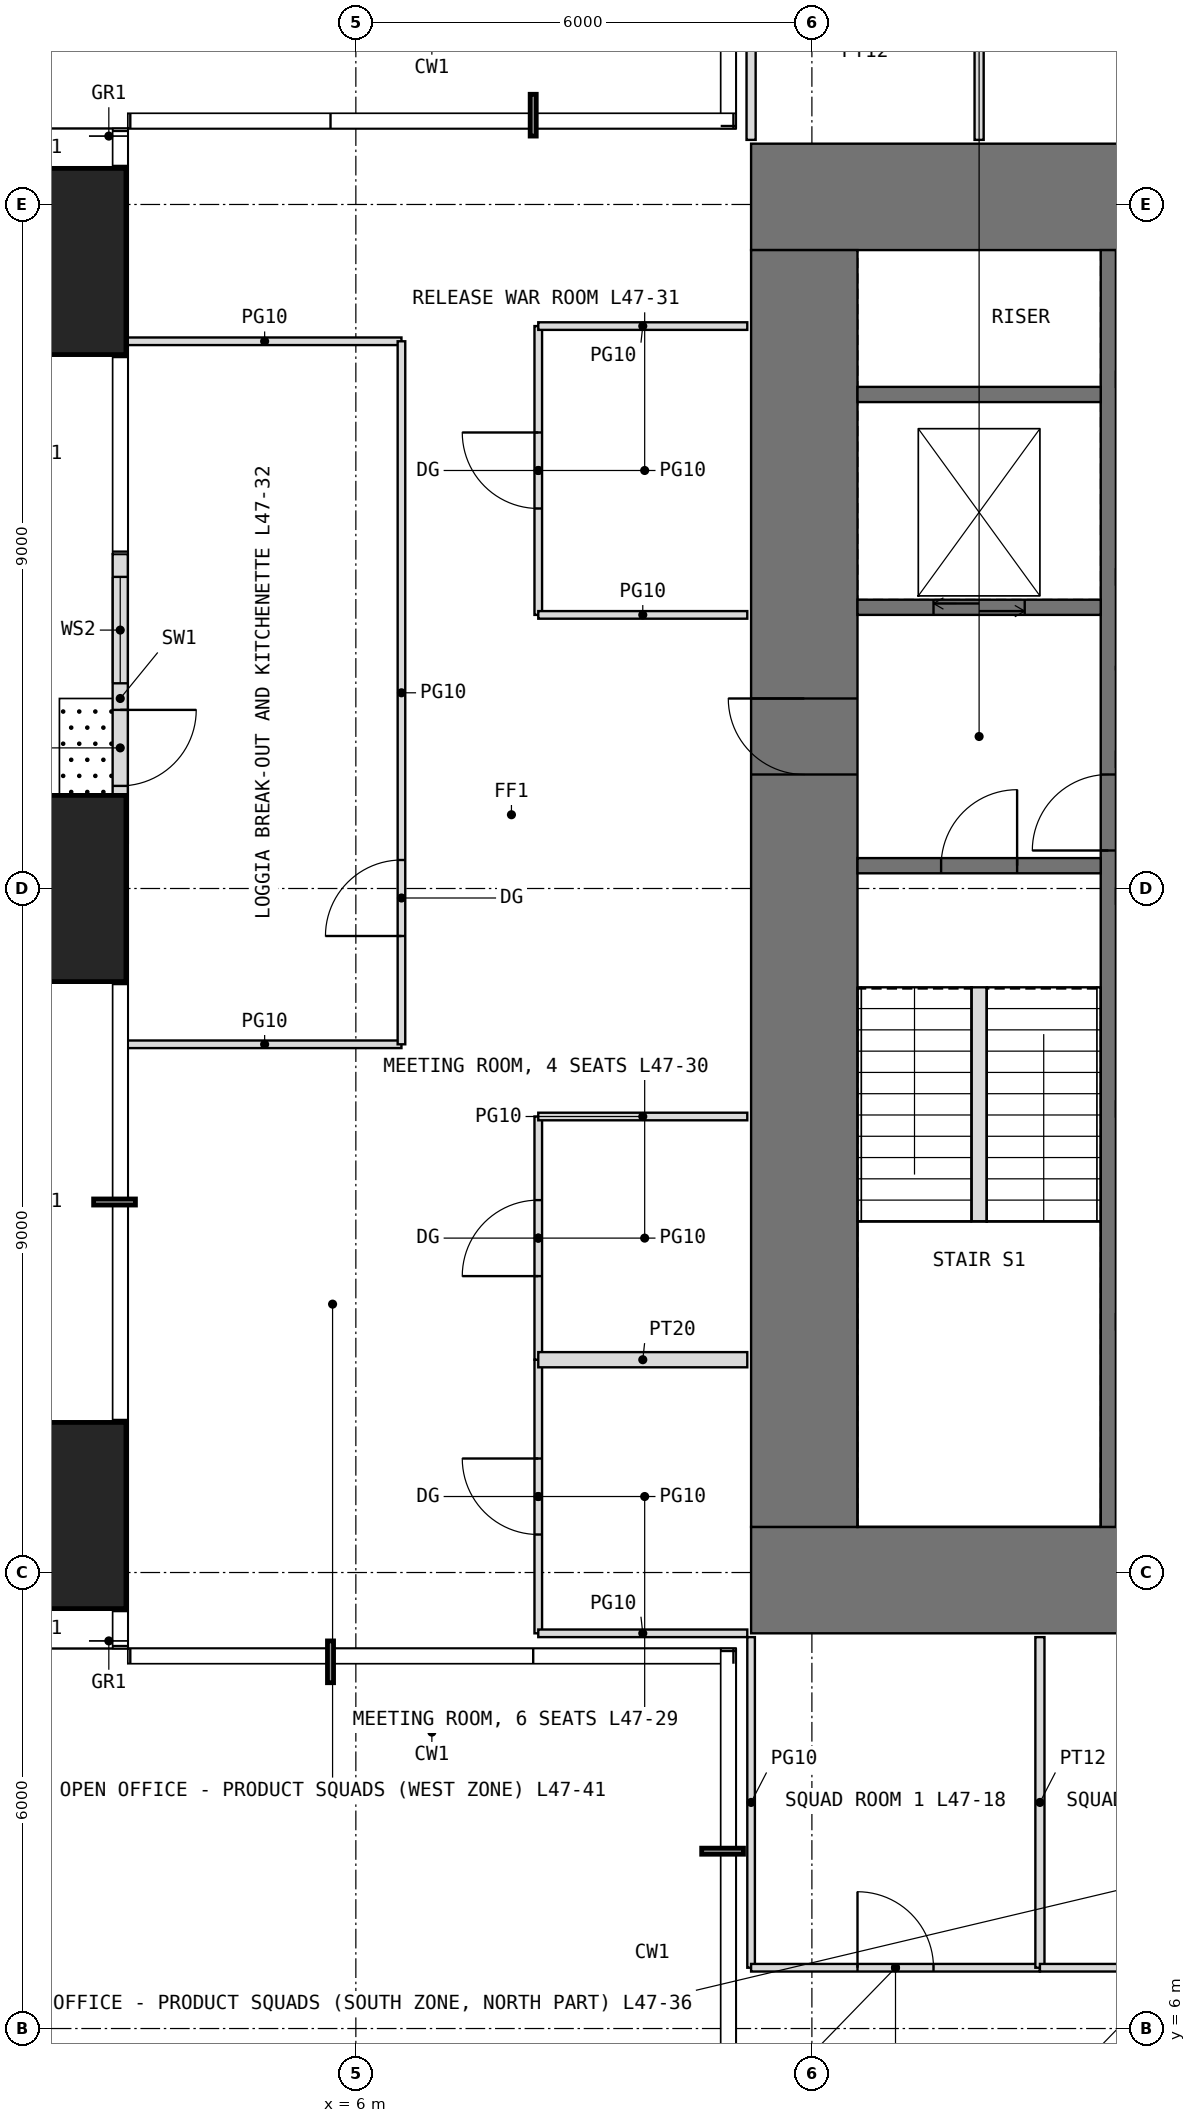
"""IFC4 building model, lengths in metres.
Left out: names, types, materials, properties, quantities, classifications, styles, units other than length and angle.
Written with IfcOpenShell. Run it as: python <this file> out.ifc"""

import sys

from ifc_helpers import new_model, si_unit, direction, frame, frame_2d, origin, origin_2d, place, context, subcontext, project, spatial, rectangle, extrude, element, fill, save


model = new_model("IFC4")
c1 = context("Model", 3, precision=1e-05, world=origin(), true_north=direction((0.0, 1.0)))
c2 = subcontext(c1, "Body", "Model", "MODEL_VIEW")
j1 = project(units=[si_unit("LENGTHUNIT", "METRE"), si_unit("PLANEANGLEUNIT", "RADIAN")], contexts=[c1])
p1 = place(None, origin())
s1 = spatial("IfcSite", under=j1, at=p1, CompositionType="ELEMENT")
p2 = place(p1, origin())
s2 = spatial("IfcBuilding", under=s1, at=p2, CompositionType="ELEMENT")
p3 = place(p2, frame((0.0, 0.0, 198.5)))
s3 = spatial("IfcBuildingStorey", under=s2, at=p3, CompositionType="ELEMENT", Elevation=198.5)
for number, where, z_axis, x_axis in (
    (1, (1.75, 12.75, 0.0), (0.0, 0.0, 1.0), (1.0, 0.0, 0.0)),
    (2, (1.75, 21.0, 0.0), (0.0, 0.0, 1.0), (1.0, 0.0, 0.0)),
    (3, (1.75, 29.25, 0.0), (0.0, 0.0, 1.0), (1.0, 0.0, 0.0)),
):
    element("IfcColumn", number, at=place(p3, frame(where, z_axis=z_axis, x_axis=x_axis)), inside=s3, PredefinedType="COLUMN", context=c2, shape_type="SweptSolid", body=[
        extrude(rectangle(XDim=2.45, YDim=2.45, at=origin_2d()), origin(), (0.0, 0.0, 1.0), 4.0),
    ])
p4 = place(p3, frame((2.9, 25.4, 0.0), z_axis=(0.0, 0.0, 1.0), x_axis=(0.0, -1.0, 0.0)))
e4 = element("IfcWall", 4, at=p4, inside=s3, PredefinedType="USERDEFINED", context=c2, shape_type="SweptSolid", body=[
    extrude(rectangle(XDim=3.8, YDim=0.2, at=frame_2d((1.9, 0.0))), origin(), (0.0, 0.0, 1.0), 3.75),
])
p5 = place(p4, frame((2.05, 0.0, 0.0)))
e5 = element("IfcOpeningElement", 5, at=p5, cuts=e4, PredefinedType="OPENING", context=c2, shape_type="SweptSolid", body=[
    extrude(rectangle(XDim=1.0, YDim=2.4, at=frame_2d((0.5, 1.2))), frame((0.0, 0.11, 0.0), z_axis=(0.0, -1.0, 0.0), x_axis=(1.0, 0.0, 0.0)), (0.0, 0.0, 1.0), 0.22),
])
p6 = place(p4, frame((0.3, 0.0, 0.3)))
e6 = element("IfcOpeningElement", 6, at=p6, cuts=e4, PredefinedType="OPENING", context=c2, shape_type="SweptSolid", body=[
    extrude(rectangle(XDim=1.4, YDim=2.7, at=frame_2d((0.7, 1.35))), frame((0.0, 0.11, 0.0), z_axis=(0.0, -1.0, 0.0), x_axis=(1.0, 0.0, 0.0)), (0.0, 0.0, 1.0), 0.22),
])
p7 = place(p3, frame((11.2, 11.9, -0.05), z_axis=(0.0, 0.0, 1.0), x_axis=(1.0, 0.0, 0.0)))
e7 = element("IfcWall", 7, at=p7, inside=s3, PredefinedType="SHEAR", context=c2, shape_type="SweptSolid", body=[
    extrude(rectangle(XDim=19.6, YDim=1.4, at=frame_2d((9.8, 0.0))), origin(), (0.0, 0.0, 1.0), 4.0),
])
p8 = place(p7, frame((8.8, 0.0, 0.05)))
e8 = element("IfcOpeningElement", 8, at=p8, cuts=e7, PredefinedType="OPENING", context=c2, shape_type="SweptSolid", body=[
    extrude(rectangle(XDim=2.0, YDim=2.2, at=frame_2d((1.0, 1.1))), frame((0.0, 0.71, 0.0), z_axis=(0.0, -1.0, 0.0), x_axis=(1.0, 0.0, 0.0)), (0.0, 0.0, 1.0), 1.42),
])
p9 = place(p3, frame((11.2, 30.1, -0.05), z_axis=(0.0, 0.0, 1.0), x_axis=(1.0, 0.0, 0.0)))
e9 = element("IfcWall", 9, at=p9, inside=s3, PredefinedType="SHEAR", context=c2, shape_type="SweptSolid", body=[
    extrude(rectangle(XDim=19.6, YDim=1.4, at=frame_2d((9.8, 0.0))), origin(), (0.0, 0.0, 1.0), 4.0),
])
p10 = place(p9, frame((8.8, 0.0, 0.05)))
e10 = element("IfcOpeningElement", 10, at=p10, cuts=e9, PredefinedType="OPENING", context=c2, shape_type="SweptSolid", body=[
    extrude(rectangle(XDim=2.0, YDim=2.2, at=frame_2d((1.0, 1.1))), frame((0.0, 0.71, 0.0), z_axis=(0.0, -1.0, 0.0), x_axis=(1.0, 0.0, 0.0)), (0.0, 0.0, 1.0), 1.42),
])
p11 = place(p3, frame((11.9, 12.6, -0.05), z_axis=(0.0, 0.0, 1.0), x_axis=(0.0, 1.0, 0.0)))
e11 = element("IfcWall", 11, at=p11, inside=s3, PredefinedType="SHEAR", context=c2, shape_type="SweptSolid", body=[
    extrude(rectangle(XDim=16.8, YDim=1.4, at=frame_2d((8.4, 0.0))), origin(), (0.0, 0.0, 1.0), 4.0),
])
p12 = place(p11, frame((9.9, 0.0, 0.05)))
e12 = element("IfcOpeningElement", 12, at=p12, cuts=e11, PredefinedType="OPENING", context=c2, shape_type="SweptSolid", body=[
    extrude(rectangle(XDim=1.0, YDim=2.2, at=frame_2d((0.5, 1.1))), frame((0.0, 0.71, 0.0), z_axis=(0.0, -1.0, 0.0), x_axis=(1.0, 0.0, 0.0)), (0.0, 0.0, 1.0), 1.42),
])
p13 = place(p3, frame((15.9, 12.6, -0.05), z_axis=(0.0, 0.0, 1.0), x_axis=(0.0, 1.0, 0.0)))
e13 = element("IfcWall", 13, at=p13, inside=s3, PredefinedType="SHEAR", context=c2, shape_type="SweptSolid", body=[
    extrude(rectangle(XDim=16.8, YDim=0.2, at=frame_2d((8.4, 0.0))), origin(), (0.0, 0.0, 1.0), 4.0),
])
p14 = place(p13, frame((8.9, 0.0, 0.05)))
e14 = element("IfcOpeningElement", 14, at=p14, cuts=e13, PredefinedType="OPENING", context=c2, shape_type="SweptSolid", body=[
    extrude(rectangle(XDim=1.0, YDim=2.2, at=frame_2d((0.5, 1.1))), frame((0.0, 0.11, 0.0), z_axis=(0.0, -1.0, 0.0), x_axis=(1.0, 0.0, 0.0)), (0.0, 0.0, 1.0), 0.22),
])
p15 = place(p3, frame((12.6, 21.3, -0.05), z_axis=(0.0, 0.0, 1.0), x_axis=(1.0, 0.0, 0.0)))
e15 = element("IfcWall", 15, at=p15, inside=s3, PredefinedType="SHEAR", context=c2, shape_type="SweptSolid", body=[
    extrude(rectangle(XDim=3.2, YDim=0.2, at=frame_2d((1.6, 0.0))), origin(), (0.0, 0.0, 1.0), 4.0),
])
p16 = place(p15, frame((1.1, 0.0, 0.05)))
e16 = element("IfcOpeningElement", 16, at=p16, cuts=e15, PredefinedType="OPENING", context=c2, shape_type="SweptSolid", body=[
    extrude(rectangle(XDim=1.0, YDim=2.2, at=frame_2d((0.5, 1.1))), frame((0.0, 0.11, 0.0), z_axis=(0.0, -1.0, 0.0), x_axis=(1.0, 0.0, 0.0)), (0.0, 0.0, 1.0), 0.22),
])
p17 = place(p3, frame((12.6, 24.7, -0.05), z_axis=(0.0, 0.0, 1.0), x_axis=(1.0, 0.0, 0.0)))
e17 = element("IfcWall", 17, at=p17, inside=s3, PredefinedType="SHEAR", context=c2, shape_type="SweptSolid", body=[
    extrude(rectangle(XDim=3.2, YDim=0.2, at=frame_2d((1.6, 0.0))), origin(), (0.0, 0.0, 1.0), 4.0),
])
p18 = place(p17, frame((1.0, 0.0, 0.05)))
e18 = element("IfcOpeningElement", 18, at=p18, cuts=e17, PredefinedType="OPENING", context=c2, shape_type="SweptSolid", body=[
    extrude(rectangle(XDim=1.2, YDim=2.2, at=frame_2d((0.6, 1.1))), frame((0.0, 0.11, 0.0), z_axis=(0.0, -1.0, 0.0), x_axis=(1.0, 0.0, 0.0)), (0.0, 0.0, 1.0), 0.22),
])
p19 = place(p3, frame((12.6, 27.5, -0.05), z_axis=(0.0, 0.0, 1.0), x_axis=(1.0, 0.0, 0.0)))
e19 = element("IfcWall", 19, at=p19, inside=s3, PredefinedType="SHEAR", context=c2, shape_type="SweptSolid", body=[
    extrude(rectangle(XDim=3.2, YDim=0.2, at=frame_2d((1.6, 0.0))), origin(), (0.0, 0.0, 1.0), 4.0),
])
for number, where, z_axis, x_axis in (
    (20, (3.0, 18.95, 0.0), (0.0, 0.0, 1.0), (1.0, 0.0, 0.0)),
    (21, (3.0, 28.2, 0.0), (0.0, 0.0, 1.0), (1.0, 0.0, 0.0)),
):
    element("IfcWall", number, at=place(p3, frame(where, z_axis=z_axis, x_axis=x_axis)), inside=s3, PredefinedType="PARTITIONING", context=c2, shape_type="SweptSolid", body=[
        extrude(rectangle(XDim=3.6, YDim=0.1, at=frame_2d((1.8, 0.0))), origin(), (0.0, 0.0, 1.0), 3.75),
    ])
p20 = place(p3, frame((6.6, 18.95, 0.0), z_axis=(0.0, 0.0, 1.0), x_axis=(0.0, 1.0, 0.0)))
e22 = element("IfcWall", 22, at=p20, inside=s3, PredefinedType="PARTITIONING", context=c2, shape_type="SweptSolid", body=[
    extrude(rectangle(XDim=9.25, YDim=0.1, at=frame_2d((4.625, 0.0))), origin(), (0.0, 0.0, 1.0), 3.75),
])
p21 = place(p20, frame((1.425, 0.0, 0.0)))
e23 = element("IfcOpeningElement", 23, at=p21, cuts=e22, PredefinedType="OPENING", context=c2, shape_type="SweptSolid", body=[
    extrude(rectangle(XDim=1.0, YDim=2.4, at=frame_2d((0.5, 1.2))), frame((0.0, 0.06, 0.0), z_axis=(0.0, -1.0, 0.0), x_axis=(1.0, 0.0, 0.0)), (0.0, 0.0, 1.0), 0.12),
])
p22 = place(p3, frame((8.4, 11.2, 0.0), z_axis=(0.0, 0.0, 1.0), x_axis=(0.0, 1.0, 0.0)))
e24 = element("IfcWall", 24, at=p22, inside=s3, PredefinedType="PARTITIONING", context=c2, shape_type="SweptSolid", body=[
    extrude(rectangle(XDim=3.6, YDim=0.1, at=frame_2d((1.8, 0.0))), origin(), (0.0, 0.0, 1.0), 3.75),
])
p23 = place(p22, frame((1.3, 0.0, 0.0)))
e25 = element("IfcOpeningElement", 25, at=p23, cuts=e24, PredefinedType="OPENING", context=c2, shape_type="SweptSolid", body=[
    extrude(rectangle(XDim=1.0, YDim=2.4, at=frame_2d((0.5, 1.2))), frame((0.0, 0.06, 0.0), z_axis=(0.0, -1.0, 0.0), x_axis=(1.0, 0.0, 0.0)), (0.0, 0.0, 1.0), 0.12),
])
p24 = place(p3, frame((8.4, 11.2, 0.0), z_axis=(0.0, 0.0, 1.0), x_axis=(1.0, 0.0, 0.0)))
e26 = element("IfcWall", 26, at=p24, inside=s3, PredefinedType="PARTITIONING", context=c2, shape_type="SweptSolid", body=[
    extrude(rectangle(XDim=2.75, YDim=0.1, at=frame_2d((1.375, 0.0))), origin(), (0.0, 0.0, 1.0), 3.75),
])
p25 = place(p3, frame((8.4, 14.8, 0.0), z_axis=(0.0, 0.0, 1.0), x_axis=(0.0, 1.0, 0.0)))
e27 = element("IfcWall", 27, at=p25, inside=s3, PredefinedType="PARTITIONING", context=c2, shape_type="SweptSolid", body=[
    extrude(rectangle(XDim=3.2, YDim=0.1, at=frame_2d((1.6, 0.0))), origin(), (0.0, 0.0, 1.0), 3.75),
])
p26 = place(p25, frame((1.1, 0.0, 0.0)))
e28 = element("IfcOpeningElement", 28, at=p26, cuts=e27, PredefinedType="OPENING", context=c2, shape_type="SweptSolid", body=[
    extrude(rectangle(XDim=1.0, YDim=2.4, at=frame_2d((0.5, 1.2))), frame((0.0, 0.06, 0.0), z_axis=(0.0, -1.0, 0.0), x_axis=(1.0, 0.0, 0.0)), (0.0, 0.0, 1.0), 0.12),
])
p27 = place(p3, frame((8.4, 14.8, 0.0), z_axis=(0.0, 0.0, 1.0), x_axis=(1.0, 0.0, 0.0)))
e29 = element("IfcWall", 29, at=p27, inside=s3, PredefinedType="PARTITIONING", context=c2, shape_type="SweptSolid", body=[
    extrude(rectangle(XDim=2.75, YDim=0.2, at=frame_2d((1.375, 0.0))), origin(), (0.0, 0.0, 1.0), 3.75),
])
p28 = place(p3, frame((8.4, 18.0, 0.0), z_axis=(0.0, 0.0, 1.0), x_axis=(1.0, 0.0, 0.0)))
e30 = element("IfcWall", 30, at=p28, inside=s3, PredefinedType="PARTITIONING", context=c2, shape_type="SweptSolid", body=[
    extrude(rectangle(XDim=2.75, YDim=0.1, at=frame_2d((1.375, 0.0))), origin(), (0.0, 0.0, 1.0), 3.75),
])
p29 = place(p3, frame((8.4, 24.6, 0.0), z_axis=(0.0, 0.0, 1.0), x_axis=(0.0, 1.0, 0.0)))
e31 = element("IfcWall", 31, at=p29, inside=s3, PredefinedType="PARTITIONING", context=c2, shape_type="SweptSolid", body=[
    extrude(rectangle(XDim=3.8, YDim=0.1, at=frame_2d((1.9, 0.0))), origin(), (0.0, 0.0, 1.0), 3.75),
])
p30 = place(p29, frame((1.4, 0.0, 0.0)))
e32 = element("IfcOpeningElement", 32, at=p30, cuts=e31, PredefinedType="OPENING", context=c2, shape_type="SweptSolid", body=[
    extrude(rectangle(XDim=1.0, YDim=2.4, at=frame_2d((0.5, 1.2))), frame((0.0, 0.06, 0.0), z_axis=(0.0, -1.0, 0.0), x_axis=(1.0, 0.0, 0.0)), (0.0, 0.0, 1.0), 0.12),
])
for number, where, z_axis, x_axis in (
    (33, (8.4, 24.6, 0.0), (0.0, 0.0, 1.0), (1.0, 0.0, 0.0)),
    (34, (8.4, 28.4, 0.0), (0.0, 0.0, 1.0), (1.0, 0.0, 0.0)),
):
    element("IfcWall", number, at=place(p3, frame(where, z_axis=z_axis, x_axis=x_axis)), inside=s3, PredefinedType="PARTITIONING", context=c2, shape_type="SweptSolid", body=[
        extrude(rectangle(XDim=2.75, YDim=0.1, at=frame_2d((1.375, 0.0))), origin(), (0.0, 0.0, 1.0), 3.75),
    ])
p31 = place(p3, frame((11.2, 6.8, 0.0), z_axis=(0.0, 0.0, 1.0), x_axis=(0.0, 1.0, 0.0)))
e35 = element("IfcWall", 35, at=p31, inside=s3, PredefinedType="PARTITIONING", context=c2, shape_type="SweptSolid", body=[
    extrude(rectangle(XDim=4.35, YDim=0.1, at=frame_2d((2.175, 0.0))), origin(), (0.0, 0.0, 1.0), 3.75),
])
p32 = place(p3, frame((11.2, 6.8, 0.0), z_axis=(0.0, 0.0, 1.0), x_axis=(1.0, 0.0, 0.0)))
e36 = element("IfcWall", 36, at=p32, inside=s3, PredefinedType="PARTITIONING", context=c2, shape_type="SweptSolid", body=[
    extrude(rectangle(XDim=3.8, YDim=0.1, at=frame_2d((1.9, 0.0))), origin(), (0.0, 0.0, 1.0), 3.75),
])
p33 = place(p32, frame((1.4, 0.0, 0.0)))
e37 = element("IfcOpeningElement", 37, at=p33, cuts=e36, PredefinedType="OPENING", context=c2, shape_type="SweptSolid", body=[
    extrude(rectangle(XDim=1.0, YDim=2.4, at=frame_2d((0.5, 1.2))), frame((0.0, 0.06, 0.0), z_axis=(0.0, -1.0, 0.0), x_axis=(1.0, 0.0, 0.0)), (0.0, 0.0, 1.0), 0.12),
])
for number, where, z_axis, x_axis in (
    (38, (11.2, 30.85, 0.0), (0.0, 0.0, 1.0), (0.0, 1.0, 0.0)),
    (39, (14.2, 30.85, 0.0), (0.0, 0.0, 1.0), (0.0, 1.0, 0.0)),
):
    element("IfcWall", number, at=place(p3, frame(where, z_axis=z_axis, x_axis=x_axis)), inside=s3, PredefinedType="PARTITIONING", context=c2, shape_type="SweptSolid", body=[
        extrude(rectangle(XDim=3.05, YDim=0.12, at=frame_2d((1.525, 0.0))), origin(), (0.0, 0.0, 1.0), 3.75),
    ])
p34 = place(p3, frame((15.0, 6.8, 0.0), z_axis=(0.0, 0.0, 1.0), x_axis=(0.0, 1.0, 0.0)))
e40 = element("IfcWall", 40, at=p34, inside=s3, PredefinedType="PARTITIONING", context=c2, shape_type="SweptSolid", body=[
    extrude(rectangle(XDim=4.35, YDim=0.12, at=frame_2d((2.175, 0.0))), origin(), (0.0, 0.0, 1.0), 3.75),
])
p35 = place(p3, frame((15.0, 6.8, 0.0), z_axis=(0.0, 0.0, 1.0), x_axis=(1.0, 0.0, 0.0)))
e41 = element("IfcWall", 41, at=p35, inside=s3, PredefinedType="PARTITIONING", context=c2, shape_type="SweptSolid", body=[
    extrude(rectangle(XDim=3.6, YDim=0.1, at=frame_2d((1.8, 0.0))), origin(), (0.0, 0.0, 1.0), 3.75),
])
p36 = place(p35, frame((1.3, 0.0, 0.0)))
e42 = element("IfcOpeningElement", 42, at=p36, cuts=e41, PredefinedType="OPENING", context=c2, shape_type="SweptSolid", body=[
    extrude(rectangle(XDim=1.0, YDim=2.4, at=frame_2d((0.5, 1.2))), frame((0.0, 0.06, 0.0), z_axis=(0.0, -1.0, 0.0), x_axis=(1.0, 0.0, 0.0)), (0.0, 0.0, 1.0), 0.12),
])
p37 = place(p3, frame((14.2, 16.62, 0.0), z_axis=(0.0, 0.0, 1.0), x_axis=(0.0, 1.0, 0.0)))
e43 = element("IfcWall", 43, at=p37, inside=s3, PredefinedType="PARTITIONING", context=c2, shape_type="SweptSolid", body=[
    extrude(rectangle(XDim=3.08, YDim=0.2, at=frame_2d((1.54, 0.0))), origin(), (0.0, 0.0, 1.0), 4.0),
])
p38 = place(p5, origin())
e44 = element("IfcDoor", 44, at=p38, inside=s3, OperationType="SINGLE_SWING_LEFT", PredefinedType="DOOR", context=c2, shape_type="SweptSolid", body=[
    extrude(rectangle(XDim=1.0, YDim=2.4, at=frame_2d((0.5, 1.2))), frame((0.0, 0.025, 0.0), z_axis=(0.0, -1.0, 0.0), x_axis=(1.0, 0.0, 0.0)), (0.0, 0.0, 1.0), 0.05),
])
fill(e5, e44)
p39 = place(p6, origin())
e45 = element("IfcWindow", 45, at=p39, inside=s3, PartitioningType="SINGLE_PANEL", PredefinedType="WINDOW", context=c2, shape_type="SweptSolid", body=[
    extrude(rectangle(XDim=1.4, YDim=2.7, at=frame_2d((0.7, 1.35))), frame((0.0, 0.03, 0.0), z_axis=(0.0, -1.0, 0.0), x_axis=(1.0, 0.0, 0.0)), (0.0, 0.0, 1.0), 0.06),
])
fill(e6, e45)
p40 = place(p12, origin())
e46 = element("IfcDoor", 46, at=p40, inside=s3, OperationType="SINGLE_SWING_RIGHT", PredefinedType="DOOR", context=c2, shape_type="SweptSolid", body=[
    extrude(rectangle(XDim=1.0, YDim=2.2, at=frame_2d((0.5, 1.1))), frame((0.0, 0.025, 0.0), z_axis=(0.0, -1.0, 0.0), x_axis=(1.0, 0.0, 0.0)), (0.0, 0.0, 1.0), 0.05),
])
fill(e12, e46)
p41 = place(p16, origin())
e47 = element("IfcDoor", 47, at=p41, inside=s3, OperationType="SINGLE_SWING_RIGHT", PredefinedType="DOOR", context=c2, shape_type="SweptSolid", body=[
    extrude(rectangle(XDim=1.0, YDim=2.2, at=frame_2d((0.5, 1.1))), frame((0.0, 0.025, 0.0), z_axis=(0.0, -1.0, 0.0), x_axis=(1.0, 0.0, 0.0)), (0.0, 0.0, 1.0), 0.05),
])
fill(e16, e47)
p42 = place(p14, origin())
e48 = element("IfcDoor", 48, at=p42, inside=s3, OperationType="SINGLE_SWING_LEFT", PredefinedType="DOOR", context=c2, shape_type="SweptSolid", body=[
    extrude(rectangle(XDim=1.0, YDim=2.2, at=frame_2d((0.5, 1.1))), frame((0.0, 0.025, 0.0), z_axis=(0.0, -1.0, 0.0), x_axis=(1.0, 0.0, 0.0)), (0.0, 0.0, 1.0), 0.05),
])
fill(e14, e48)
p43 = place(p33, origin())
e49 = element("IfcDoor", 49, at=p43, inside=s3, OperationType="SINGLE_SWING_LEFT", PredefinedType="DOOR", context=c2, shape_type="SweptSolid", body=[
    extrude(rectangle(XDim=1.0, YDim=2.4, at=frame_2d((0.5, 1.2))), frame((0.0, 0.025, 0.0), z_axis=(0.0, -1.0, 0.0), x_axis=(1.0, 0.0, 0.0)), (0.0, 0.0, 1.0), 0.05),
])
fill(e37, e49)
p44 = place(p23, origin())
e50 = element("IfcDoor", 50, at=p44, inside=s3, OperationType="SINGLE_SWING_RIGHT", PredefinedType="DOOR", context=c2, shape_type="SweptSolid", body=[
    extrude(rectangle(XDim=1.0, YDim=2.4, at=frame_2d((0.5, 1.2))), frame((0.0, 0.025, 0.0), z_axis=(0.0, -1.0, 0.0), x_axis=(1.0, 0.0, 0.0)), (0.0, 0.0, 1.0), 0.05),
])
fill(e25, e50)
p45 = place(p26, origin())
e51 = element("IfcDoor", 51, at=p45, inside=s3, OperationType="SINGLE_SWING_LEFT", PredefinedType="DOOR", context=c2, shape_type="SweptSolid", body=[
    extrude(rectangle(XDim=1.0, YDim=2.4, at=frame_2d((0.5, 1.2))), frame((0.0, 0.025, 0.0), z_axis=(0.0, -1.0, 0.0), x_axis=(1.0, 0.0, 0.0)), (0.0, 0.0, 1.0), 0.05),
])
fill(e28, e51)
p46 = place(p30, origin())
e52 = element("IfcDoor", 52, at=p46, inside=s3, OperationType="SINGLE_SWING_RIGHT", PredefinedType="DOOR", context=c2, shape_type="SweptSolid", body=[
    extrude(rectangle(XDim=1.0, YDim=2.4, at=frame_2d((0.5, 1.2))), frame((0.0, 0.025, 0.0), z_axis=(0.0, -1.0, 0.0), x_axis=(1.0, 0.0, 0.0)), (0.0, 0.0, 1.0), 0.05),
])
fill(e32, e52)
p47 = place(p21, origin())
e53 = element("IfcDoor", 53, at=p47, inside=s3, OperationType="SINGLE_SWING_LEFT", PredefinedType="DOOR", context=c2, shape_type="SweptSolid", body=[
    extrude(rectangle(XDim=1.0, YDim=2.4, at=frame_2d((0.5, 1.2))), frame((0.0, 0.025, 0.0), z_axis=(0.0, -1.0, 0.0), x_axis=(1.0, 0.0, 0.0)), (0.0, 0.0, 1.0), 0.05),
])
fill(e23, e53)
p48 = place(p18, origin())
e54 = element("IfcDoor", 54, at=p48, inside=s3, OperationType="DOUBLE_DOOR_SLIDING", PredefinedType="DOOR", context=c2, shape_type="SweptSolid", body=[
    extrude(rectangle(XDim=1.2, YDim=2.2, at=frame_2d((0.6, 1.1))), frame((0.0, 0.025, 0.0), z_axis=(0.0, -1.0, 0.0), x_axis=(1.0, 0.0, 0.0)), (0.0, 0.0, 1.0), 0.05),
])
fill(e18, e54)
save(model, sys.argv[1])
